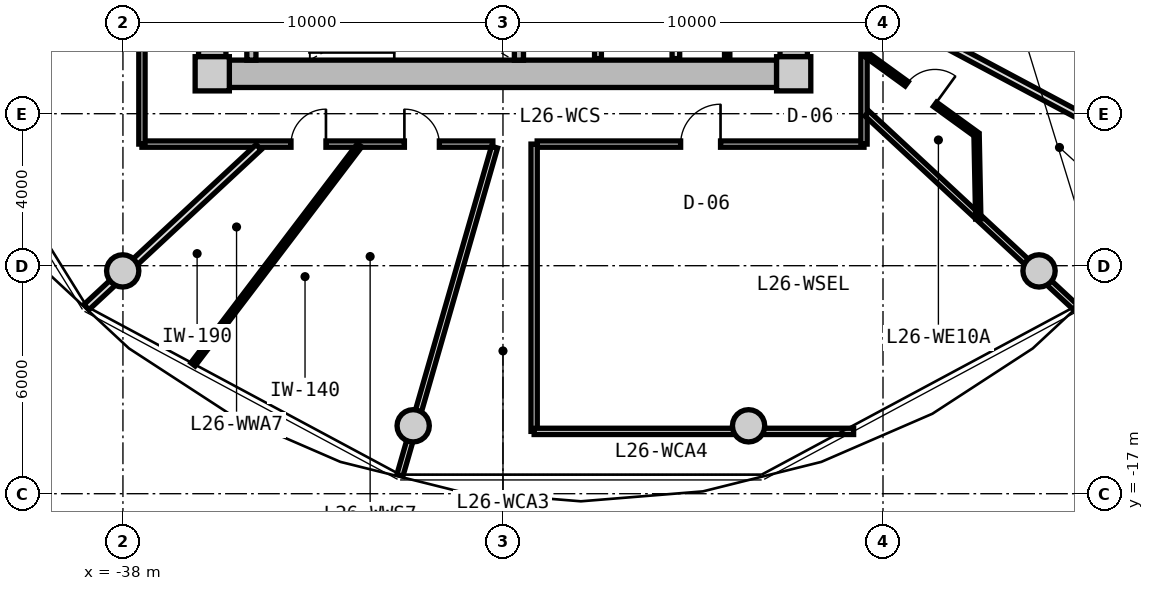
"""IFC4 building model, lengths in metres.
Left out: names, types, materials, properties, quantities, classifications, styles, units other than length and angle.
Written with IfcOpenShell. Run it as: python <this file> out.ifc"""

import sys

from ifc_helpers import new_model, si_unit, direction, frame, frame_2d, origin, origin_2d, place, context, subcontext, project, spatial, rectangle, circle, extrude, source, transform, mapped, element, fill, save


model = new_model("IFC4")
c1 = context("Model", 3, precision=1e-05, world=origin(), true_north=direction((0.0, 1.0)))
c2 = subcontext(c1, "Body", "Model", "MODEL_VIEW")
j1 = project(units=[si_unit("LENGTHUNIT", "METRE"), si_unit("PLANEANGLEUNIT", "RADIAN")], contexts=[c1])
p1 = place(None, origin())
s1 = spatial("IfcSite", under=j1, at=p1, CompositionType="ELEMENT")
p2 = place(p1, origin())
s2 = spatial("IfcBuilding", under=s1, at=p2, CompositionType="ELEMENT")
p3 = place(p2, frame((0.0, 0.0, 87.1)))
s3 = spatial("IfcBuildingStorey", under=s2, at=p3, CompositionType="ELEMENT", Elevation=87.1)
m1 = source(origin(), c2, "Body", "SweptSolid", [
    extrude(rectangle(XDim=0.9, YDim=0.9, at=origin_2d()), origin(), (0.0, 0.0, 1.0), 3.05),
])
for number, where, z_axis, x_axis in (
    (1, (-35.65, -5.95, 0.0), (0.0, 0.0, 1.0), (1.0, 0.0, 0.0)),
    (2, (-20.35, -5.95, 0.0), (0.0, 0.0, 1.0), (1.0, 0.0, 0.0)),
):
    element("IfcColumn", number, at=place(p3, frame(where, z_axis=z_axis, x_axis=x_axis)), inside=s3, PredefinedType="COLUMN", context=c2, shape_type="MappedRepresentation", body=[
        mapped(m1, transform((0.0, 0.0, 0.0), x_axis=(1.0, 0.0, 0.0), y_axis=(0.0, 1.0, 0.0), z_axis=(0.0, 0.0, 1.0), scale=1.0)),
    ])
m2 = source(origin(), c2, "Body", "SweptSolid", [
    extrude(rectangle(XDim=14.4, YDim=0.72, at=frame_2d((7.2, 0.0))), origin(), (0.0, 0.0, 1.0), 2.79),
])
p4 = place(p3, frame((-20.8, -5.95, 0.0), z_axis=(0.0, 0.0, 1.0), x_axis=(-1.0, 0.0, 0.0)))
e3 = element("IfcWall", 3, at=p4, inside=s3, PredefinedType="SHEAR", context=c2, shape_type="MappedRepresentation", body=[
    mapped(m2, transform((0.0, 0.0, 0.0), x_axis=(1.0, 0.0, 0.0), y_axis=(0.0, 1.0, 0.0), z_axis=(0.0, 0.0, 1.0), scale=1.0)),
])
m3 = source(origin(), c2, "Body", "SweptSolid", [
    extrude(rectangle(XDim=11.0, YDim=0.72, at=frame_2d((5.5, 0.0))), origin(), (0.0, 0.0, 1.0), 2.79),
])
p5 = place(p3, frame((-35.65, -5.5, 0.0), z_axis=(0.0, 0.0, 1.0), x_axis=(0.0, 1.0, 0.0)))
e4 = element("IfcWall", 4, at=p5, inside=s3, PredefinedType="SHEAR", context=c2, shape_type="MappedRepresentation", body=[
    mapped(m3, transform((0.0, 0.0, 0.0), x_axis=(1.0, 0.0, 0.0), y_axis=(0.0, 1.0, 0.0), z_axis=(0.0, 0.0, 1.0), scale=1.0)),
])
p6 = place(p5, frame((3.8, 0.0, 0.0)))
e5 = element("IfcOpeningElement", 5, at=p6, cuts=e4, PredefinedType="OPENING", context=c2, shape_type="SweptSolid", body=[
    extrude(rectangle(XDim=1.2, YDim=2.15, at=frame_2d((0.6, 1.075))), frame((0.0, 0.37, 0.0), z_axis=(0.0, -1.0, 0.0), x_axis=(1.0, 0.0, 0.0)), (0.0, 0.0, 1.0), 0.74),
])
p7 = place(p3, frame((-20.35, 5.5, 0.0), z_axis=(0.0, 0.0, 1.0), x_axis=(0.0, -1.0, 0.0)))
e6 = element("IfcWall", 6, at=p7, inside=s3, PredefinedType="SHEAR", context=c2, shape_type="MappedRepresentation", body=[
    mapped(m3, transform((0.0, 0.0, 0.0), x_axis=(1.0, 0.0, 0.0), y_axis=(0.0, 1.0, 0.0), z_axis=(0.0, 0.0, 1.0), scale=1.0)),
])
p8 = place(p7, frame((5.65, 0.0, 0.0)))
e7 = element("IfcOpeningElement", 7, at=p8, cuts=e6, PredefinedType="OPENING", context=c2, shape_type="SweptSolid", body=[
    extrude(rectangle(XDim=1.2, YDim=2.15, at=frame_2d((0.6, 1.075))), frame((0.0, 0.37, 0.0), z_axis=(0.0, -1.0, 0.0), x_axis=(1.0, 0.0, 0.0)), (0.0, 0.0, 1.0), 0.74),
])
m4 = source(origin(), c2, "Body", "SweptSolid", [
    extrude(circle(Radius=0.425, at=origin_2d()), origin(), (0.0, 0.0, 1.0), 3.05),
])
for number, where, z_axis, x_axis in (
    (8, (-38.006, -11.137, 0.0), (0.0, 0.0, 1.0), (1.0, 0.0, 0.0)),
    (9, (-30.363, -15.213, 0.0), (0.0, 0.0, 1.0), (1.0, 0.0, 0.0)),
    (10, (-21.537, -15.213, 0.0), (0.0, 0.0, 1.0), (1.0, 0.0, 0.0)),
    (11, (-13.894, -11.137, 0.0), (0.0, 0.0, 1.0), (1.0, 0.0, 0.0)),
):
    element("IfcColumn", number, at=place(p3, frame(where, z_axis=z_axis, x_axis=x_axis)), inside=s3, PredefinedType="COLUMN", context=c2, shape_type="MappedRepresentation", body=[
        mapped(m4, transform((0.0, 0.0, 0.0), x_axis=(1.0, 0.0, 0.0), y_axis=(0.0, 1.0, 0.0), z_axis=(0.0, 0.0, 1.0), scale=1.0)),
    ])
m5 = source(origin(), c2, "Body", "SweptSolid", [
    extrude(rectangle(XDim=3.14, YDim=0.24, at=frame_2d((1.57, 0.0))), origin(), (0.0, 0.0, 1.0), 2.79),
])
for number, where, z_axis, x_axis in (
    (12, (-34.62, -5.59, 0.0), (0.0, 0.0, 1.0), (0.0, 1.0, 0.0)),
    (13, (-27.58, -5.59, 0.0), (0.0, 0.0, 1.0), (0.0, 1.0, 0.0)),
):
    element("IfcWall", number, at=place(p3, frame(where, z_axis=z_axis, x_axis=x_axis)), inside=s3, PredefinedType="PARTITIONING", context=c2, shape_type="MappedRepresentation", body=[
        mapped(m5, transform((0.0, 0.0, 0.0), x_axis=(1.0, 0.0, 0.0), y_axis=(0.0, 1.0, 0.0), z_axis=(0.0, 0.0, 1.0), scale=1.0)),
    ])
m6 = source(origin(), c2, "Body", "SweptSolid", [
    extrude(rectangle(XDim=3.8, YDim=0.2, at=frame_2d((1.9, 0.0))), origin(), (0.0, 0.0, 1.0), 2.775),
])
p9 = place(p3, frame((-23.45, -5.55, 0.0), z_axis=(0.0, 0.0, 1.0), x_axis=(0.0, 1.0, 0.0)))
e14 = element("IfcWall", 14, at=p9, inside=s3, PredefinedType="PARTITIONING", context=c2, shape_type="MappedRepresentation", body=[
    mapped(m6, transform((0.0, 0.0, 0.0), x_axis=(1.0, 0.0, 0.0), y_axis=(0.0, 1.0, 0.0), z_axis=(0.0, 0.0, 1.0), scale=1.0)),
])
m7 = source(origin(), c2, "Body", "SweptSolid", [
    extrude(rectangle(XDim=3.22, YDim=0.18, at=frame_2d((1.61, 0.0))), origin(), (0.0, 0.0, 1.0), 2.775),
])
p10 = place(p3, frame((-25.5, -5.55, 0.0), z_axis=(0.0, 0.0, 1.0), x_axis=(0.0, 1.0, 0.0)))
e15 = element("IfcWall", 15, at=p10, inside=s3, PredefinedType="PARTITIONING", context=c2, shape_type="MappedRepresentation", body=[
    mapped(m7, transform((0.0, 0.0, 0.0), x_axis=(1.0, 0.0, 0.0), y_axis=(0.0, 1.0, 0.0), z_axis=(0.0, 0.0, 1.0), scale=1.0)),
])
m8 = source(origin(), c2, "Body", "SweptSolid", [
    extrude(rectangle(XDim=3.8, YDim=0.14, at=frame_2d((1.9, 0.0))), origin(), (0.0, 0.0, 1.0), 2.775),
])
p11 = place(p3, frame((-22.1, -5.55, 0.0), z_axis=(0.0, 0.0, 1.0), x_axis=(0.0, 1.0, 0.0)))
e16 = element("IfcWall", 16, at=p11, inside=s3, PredefinedType="PARTITIONING", context=c2, shape_type="MappedRepresentation", body=[
    mapped(m8, transform((0.0, 0.0, 0.0), x_axis=(1.0, 0.0, 0.0), y_axis=(0.0, 1.0, 0.0), z_axis=(0.0, 0.0, 1.0), scale=1.0)),
])
m9 = source(origin(), c2, "Body", "SweptSolid", [
    extrude(rectangle(XDim=8.6, YDim=0.165, at=frame_2d((4.3, 0.0))), origin(), (0.0, 0.0, 1.0), 2.775),
])
p12 = place(p3, frame((-18.5, -7.8, 0.0), z_axis=(0.0, 0.0, 1.0), x_axis=(-1.0, 0.0, 0.0)))
e17 = element("IfcWall", 17, at=p12, inside=s3, PredefinedType="PARTITIONING", context=c2, shape_type="MappedRepresentation", body=[
    mapped(m9, transform((0.0, 0.0, 0.0), x_axis=(1.0, 0.0, 0.0), y_axis=(0.0, 1.0, 0.0), z_axis=(0.0, 0.0, 1.0), scale=1.0)),
])
p13 = place(p12, frame((3.775, 0.0, 0.0)))
e18 = element("IfcOpeningElement", 18, at=p13, cuts=e17, PredefinedType="OPENING", context=c2, shape_type="SweptSolid", body=[
    extrude(rectangle(XDim=1.05, YDim=2.15, at=frame_2d((0.525, 1.075))), frame((0.0, 0.093, 0.0), z_axis=(0.0, -1.0, 0.0), x_axis=(1.0, 0.0, 0.0)), (0.0, 0.0, 1.0), 0.185),
])
m10 = source(origin(), c2, "Body", "SweptSolid", [
    extrude(rectangle(XDim=9.234, YDim=0.165, at=frame_2d((4.617, 0.0))), origin(), (0.0, 0.0, 1.0), 2.775),
])
p14 = place(p3, frame((-28.266, -7.8, 0.0), z_axis=(0.0, 0.0, 1.0), x_axis=(-1.0, 0.0, 0.0)))
e19 = element("IfcWall", 19, at=p14, inside=s3, PredefinedType="PARTITIONING", context=c2, shape_type="MappedRepresentation", body=[
    mapped(m10, transform((0.0, 0.0, 0.0), x_axis=(1.0, 0.0, 0.0), y_axis=(0.0, 1.0, 0.0), z_axis=(0.0, 0.0, 1.0), scale=1.0)),
])
p15 = place(p14, frame((4.392, 0.0, 0.0)))
e20 = element("IfcOpeningElement", 20, at=p15, cuts=e19, PredefinedType="OPENING", context=c2, shape_type="SweptSolid", body=[
    extrude(rectangle(XDim=0.92, YDim=2.1, at=frame_2d((0.46, 1.05))), frame((0.0, 0.093, 0.0), z_axis=(0.0, -1.0, 0.0), x_axis=(1.0, 0.0, 0.0)), (0.0, 0.0, 1.0), 0.185),
])
p16 = place(p14, frame((1.408, 0.0, 0.0)))
e21 = element("IfcOpeningElement", 21, at=p16, cuts=e19, PredefinedType="OPENING", context=c2, shape_type="SweptSolid", body=[
    extrude(rectangle(XDim=0.92, YDim=2.1, at=frame_2d((0.46, 1.05))), frame((0.0, 0.093, 0.0), z_axis=(0.0, -1.0, 0.0), x_axis=(1.0, 0.0, 0.0)), (0.0, 0.0, 1.0), 0.185),
])
m11 = source(origin(), c2, "Body", "SweptSolid", [
    extrude(rectangle(XDim=15.6, YDim=0.165, at=frame_2d((7.8, 0.0))), origin(), (0.0, 0.0, 1.0), 2.775),
])
p17 = place(p3, frame((-37.5, -7.8, 0.0), z_axis=(0.0, 0.0, 1.0), x_axis=(0.0, 1.0, 0.0)))
e22 = element("IfcWall", 22, at=p17, inside=s3, PredefinedType="PARTITIONING", context=c2, shape_type="MappedRepresentation", body=[
    mapped(m11, transform((0.0, 0.0, 0.0), x_axis=(1.0, 0.0, 0.0), y_axis=(0.0, 1.0, 0.0), z_axis=(0.0, 0.0, 1.0), scale=1.0)),
])
p18 = place(p17, frame((7.175, 0.0, 0.0)))
e23 = element("IfcOpeningElement", 23, at=p18, cuts=e22, PredefinedType="OPENING", context=c2, shape_type="SweptSolid", body=[
    extrude(rectangle(XDim=1.25, YDim=2.2, at=frame_2d((0.625, 1.1))), frame((0.0, 0.093, 0.0), z_axis=(0.0, -1.0, 0.0), x_axis=(1.0, 0.0, 0.0)), (0.0, 0.0, 1.0), 0.185),
])
p19 = place(p3, frame((-18.5, 7.8, 0.0), z_axis=(0.0, 0.0, 1.0), x_axis=(0.0, -1.0, 0.0)))
e24 = element("IfcWall", 24, at=p19, inside=s3, PredefinedType="PARTITIONING", context=c2, shape_type="MappedRepresentation", body=[
    mapped(m11, transform((0.0, 0.0, 0.0), x_axis=(1.0, 0.0, 0.0), y_axis=(0.0, 1.0, 0.0), z_axis=(0.0, 0.0, 1.0), scale=1.0)),
])
p20 = place(p19, frame((12.002, 0.0, 0.0)))
e25 = element("IfcOpeningElement", 25, at=p20, cuts=e24, PredefinedType="OPENING", context=c2, shape_type="SweptSolid", body=[
    extrude(rectangle(XDim=1.05, YDim=2.15, at=frame_2d((0.525, 1.075))), frame((0.0, 0.093, 0.0), z_axis=(0.0, -1.0, 0.0), x_axis=(1.0, 0.0, 0.0)), (0.0, 0.0, 1.0), 0.185),
])
p21 = place(p19, frame((10.211, 0.0, 0.0)))
e26 = element("IfcOpeningElement", 26, at=p21, cuts=e24, PredefinedType="OPENING", context=c2, shape_type="SweptSolid", body=[
    extrude(rectangle(XDim=1.05, YDim=2.15, at=frame_2d((0.525, 1.075))), frame((0.0, 0.093, 0.0), z_axis=(0.0, -1.0, 0.0), x_axis=(1.0, 0.0, 0.0)), (0.0, 0.0, 1.0), 0.185),
])
p22 = place(p19, frame((7.722, 0.0, 0.0)))
e27 = element("IfcOpeningElement", 27, at=p22, cuts=e24, PredefinedType="OPENING", context=c2, shape_type="SweptSolid", body=[
    extrude(rectangle(XDim=1.05, YDim=2.15, at=frame_2d((0.525, 1.075))), frame((0.0, 0.093, 0.0), z_axis=(0.0, -1.0, 0.0), x_axis=(1.0, 0.0, 0.0)), (0.0, 0.0, 1.0), 0.185),
])
p23 = place(p19, frame((6.291, 0.0, 0.0)))
e28 = element("IfcOpeningElement", 28, at=p23, cuts=e24, PredefinedType="OPENING", context=c2, shape_type="SweptSolid", body=[
    extrude(rectangle(XDim=1.05, YDim=2.15, at=frame_2d((0.525, 1.075))), frame((0.0, 0.093, 0.0), z_axis=(0.0, -1.0, 0.0), x_axis=(1.0, 0.0, 0.0)), (0.0, 0.0, 1.0), 0.185),
])
p24 = place(p19, frame((4.296, 0.0, 0.0)))
e29 = element("IfcOpeningElement", 29, at=p24, cuts=e24, PredefinedType="OPENING", context=c2, shape_type="SweptSolid", body=[
    extrude(rectangle(XDim=1.05, YDim=2.15, at=frame_2d((0.525, 1.075))), frame((0.0, 0.093, 0.0), z_axis=(0.0, -1.0, 0.0), x_axis=(1.0, 0.0, 0.0)), (0.0, 0.0, 1.0), 0.185),
])
p25 = place(p19, frame((1.654, 0.0, 0.0)))
e30 = element("IfcOpeningElement", 30, at=p25, cuts=e24, PredefinedType="OPENING", context=c2, shape_type="SweptSolid", body=[
    extrude(rectangle(XDim=1.05, YDim=2.15, at=frame_2d((0.525, 1.075))), frame((0.0, 0.093, 0.0), z_axis=(0.0, -1.0, 0.0), x_axis=(1.0, 0.0, 0.0)), (0.0, 0.0, 1.0), 0.185),
])
m12 = source(origin(), c2, "Body", "SweptSolid", [
    extrude(rectangle(XDim=8.989, YDim=0.165, at=frame_2d((4.495, 0.0))), origin(), (0.0, 0.0, 1.0), 2.275),
])
p26 = place(p3, frame((-28.222, -7.88, 0.0), z_axis=(0.0, 0.0, 1.0), x_axis=(-0.27702323008, -0.960863221274, 0.0)))
e31 = element("IfcWall", 31, at=p26, inside=s3, PredefinedType="PARTITIONING", context=c2, shape_type="MappedRepresentation", body=[
    mapped(m12, transform((0.0, 0.0, 0.0), x_axis=(1.0, 0.0, 0.0), y_axis=(0.0, 1.0, 0.0), z_axis=(0.0, 0.0, 1.0), scale=1.0)),
])
m13 = source(origin(), c2, "Body", "SweptSolid", [
    extrude(rectangle(XDim=7.482, YDim=0.165, at=frame_2d((3.741, 0.0))), origin(), (0.0, 0.0, 1.0), 2.275),
])
p27 = place(p3, frame((-18.42, -6.998, 0.0), z_axis=(0.0, 0.0, 1.0), x_axis=(0.732508698043, -0.680757671489, 0.0)))
e32 = element("IfcWall", 32, at=p27, inside=s3, PredefinedType="PARTITIONING", context=c2, shape_type="MappedRepresentation", body=[
    mapped(m13, transform((0.0, 0.0, 0.0), x_axis=(1.0, 0.0, 0.0), y_axis=(0.0, 1.0, 0.0), z_axis=(0.0, 0.0, 1.0), scale=1.0)),
])
m14 = source(origin(), c2, "Body", "SweptSolid", [
    extrude(rectangle(XDim=7.56, YDim=0.165, at=frame_2d((3.78, 0.0))), origin(), (0.0, 0.0, 1.0), 2.775),
])
p28 = place(p3, frame((-27.18, -15.36, 0.0), z_axis=(0.0, 0.0, 1.0), x_axis=(0.0, 1.0, 0.0)))
e33 = element("IfcWall", 33, at=p28, inside=s3, PredefinedType="PARTITIONING", context=c2, shape_type="MappedRepresentation", body=[
    mapped(m14, transform((0.0, 0.0, 0.0), x_axis=(1.0, 0.0, 0.0), y_axis=(0.0, 1.0, 0.0), z_axis=(0.0, 0.0, 1.0), scale=1.0)),
])
m15 = source(origin(), c2, "Body", "SweptSolid", [
    extrude(rectangle(XDim=8.407, YDim=0.165, at=frame_2d((4.204, 0.0))), origin(), (0.0, 0.0, 1.0), 2.275),
])
p29 = place(p3, frame((-27.18, -15.36, 0.0), z_axis=(0.0, 0.0, 1.0), x_axis=(1.0, 0.0, 0.0)))
e34 = element("IfcWall", 34, at=p29, inside=s3, PredefinedType="PARTITIONING", context=c2, shape_type="MappedRepresentation", body=[
    mapped(m15, transform((0.0, 0.0, 0.0), x_axis=(1.0, 0.0, 0.0), y_axis=(0.0, 1.0, 0.0), z_axis=(0.0, 0.0, 1.0), scale=1.0)),
])
m16 = source(origin(), c2, "Body", "SweptSolid", [
    extrude(rectangle(XDim=6.187, YDim=0.19, at=frame_2d((3.093, 0.0))), origin(), (0.0, 0.0, 1.0), 2.275),
])
p30 = place(p3, frame((-34.429, -7.88, 0.0), z_axis=(0.0, 0.0, 1.0), x_axis=(-0.732501077882, -0.680765870841, 0.0)))
e35 = element("IfcWall", 35, at=p30, inside=s3, PredefinedType="PARTITIONING", context=c2, shape_type="MappedRepresentation", body=[
    mapped(m16, transform((0.0, 0.0, 0.0), x_axis=(1.0, 0.0, 0.0), y_axis=(0.0, 1.0, 0.0), z_axis=(0.0, 0.0, 1.0), scale=1.0)),
])
m17 = source(origin(), c2, "Body", "SweptSolid", [
    extrude(rectangle(XDim=7.243, YDim=0.14, at=frame_2d((3.621, 0.0))), origin(), (0.0, 0.0, 1.0), 2.775),
])
p31 = place(p3, frame((-31.774, -7.83, 0.0), z_axis=(0.0, 0.0, 1.0), x_axis=(-0.605111472002, -0.796140757939, 0.0)))
e36 = element("IfcWall", 36, at=p31, inside=s3, PredefinedType="PARTITIONING", context=c2, shape_type="MappedRepresentation", body=[
    mapped(m17, transform((0.0, 0.0, 0.0), x_axis=(1.0, 0.0, 0.0), y_axis=(0.0, 1.0, 0.0), z_axis=(0.0, 0.0, 1.0), scale=1.0)),
])
m18 = source(origin(), c2, "Body", "SweptSolid", [
    extrude(rectangle(XDim=8.744, YDim=0.19, at=frame_2d((4.372, 0.0))), origin(), (0.0, 0.0, 1.0), 2.775),
])
p32 = place(p3, frame((-18.273, -4.142, 0.0), z_axis=(0.0, 0.0, 1.0), x_axis=(0.882252449936, -0.470776607938, 0.0)))
e37 = element("IfcWall", 37, at=p32, inside=s3, PredefinedType="PARTITIONING", context=c2, shape_type="MappedRepresentation", body=[
    mapped(m18, transform((0.0, 0.0, 0.0), x_axis=(1.0, 0.0, 0.0), y_axis=(0.0, 1.0, 0.0), z_axis=(0.0, 0.0, 1.0), scale=1.0)),
])
m19 = source(origin(), c2, "Body", "SweptSolid", [
    extrude(rectangle(XDim=3.621, YDim=0.14, at=frame_2d((1.811, 0.0))), origin(), (0.0, 0.0, 1.0), 2.775),
])
p33 = place(p3, frame((-18.47, -5.422, 0.0), z_axis=(0.0, 0.0, 1.0), x_axis=(0.80968252222, -0.586868139544, 0.0)))
e38 = element("IfcWall", 38, at=p33, inside=s3, PredefinedType="PARTITIONING", context=c2, shape_type="MappedRepresentation", body=[
    mapped(m19, transform((0.0, 0.0, 0.0), x_axis=(1.0, 0.0, 0.0), y_axis=(0.0, 1.0, 0.0), z_axis=(0.0, 0.0, 1.0), scale=1.0)),
])
p34 = place(p33, frame((1.351, 0.0, 0.0)))
e39 = element("IfcOpeningElement", 39, at=p34, cuts=e38, PredefinedType="OPENING", context=c2, shape_type="SweptSolid", body=[
    extrude(rectangle(XDim=0.92, YDim=2.1, at=frame_2d((0.46, 1.05))), frame((0.0, 0.08, 0.0), z_axis=(0.0, -1.0, 0.0), x_axis=(1.0, 0.0, 0.0)), (0.0, 0.0, 1.0), 0.16),
])
m20 = source(origin(), c2, "Body", "SweptSolid", [
    extrude(rectangle(XDim=2.225, YDim=0.14, at=frame_2d((1.112, 0.0))), origin(), (0.0, 0.0, 1.0), 2.775),
])
p35 = place(p3, frame((-15.538, -7.547, 0.0), z_axis=(0.0, 0.0, 1.0), x_axis=(0.019971869027, -0.999800542332, 0.0)))
e40 = element("IfcWall", 40, at=p35, inside=s3, PredefinedType="PARTITIONING", context=c2, shape_type="MappedRepresentation", body=[
    mapped(m20, transform((0.0, 0.0, 0.0), x_axis=(1.0, 0.0, 0.0), y_axis=(0.0, 1.0, 0.0), z_axis=(0.0, 0.0, 1.0), scale=1.0)),
])
m21 = source(origin(), c2, "Body", "SweptSolid", [
    extrude(rectangle(XDim=1.05, YDim=2.15, at=frame_2d((0.525, 1.075))), frame((0.0, 0.025, 0.0), z_axis=(0.0, -1.0, 0.0), x_axis=(1.0, 0.0, 0.0)), (0.0, 0.0, 1.0), 0.05),
])
p36 = place(p13, frame((1.05, 0.0, 0.0), z_axis=(0.0, 0.0, 1.0), x_axis=(-1.0, 0.0, 0.0)))
e41 = element("IfcDoor", 41, at=p36, inside=s3, OperationType="SINGLE_SWING_RIGHT", PredefinedType="DOOR", context=c2, shape_type="MappedRepresentation", body=[
    mapped(m21, transform((0.0, 0.0, 0.0), x_axis=(1.0, 0.0, 0.0), y_axis=(0.0, 1.0, 0.0), z_axis=(0.0, 0.0, 1.0), scale=1.0)),
])
fill(e18, e41)
m22 = source(origin(), c2, "Body", "SweptSolid", [
    extrude(rectangle(XDim=0.92, YDim=2.1, at=frame_2d((0.46, 1.05))), frame((0.0, 0.025, 0.0), z_axis=(0.0, -1.0, 0.0), x_axis=(1.0, 0.0, 0.0)), (0.0, 0.0, 1.0), 0.05),
])
p37 = place(p15, frame((0.92, 0.0, 0.0), z_axis=(0.0, 0.0, 1.0), x_axis=(-1.0, 0.0, 0.0)))
e42 = element("IfcDoor", 42, at=p37, inside=s3, OperationType="SINGLE_SWING_RIGHT", PredefinedType="DOOR", context=c2, shape_type="MappedRepresentation", body=[
    mapped(m22, transform((0.0, 0.0, 0.0), x_axis=(1.0, 0.0, 0.0), y_axis=(0.0, 1.0, 0.0), z_axis=(0.0, 0.0, 1.0), scale=1.0)),
])
fill(e20, e42)
p38 = place(p16, frame((0.92, 0.0, 0.0), z_axis=(0.0, 0.0, 1.0), x_axis=(-1.0, 0.0, 0.0)))
e43 = element("IfcDoor", 43, at=p38, inside=s3, OperationType="SINGLE_SWING_LEFT", PredefinedType="DOOR", context=c2, shape_type="MappedRepresentation", body=[
    mapped(m22, transform((0.0, 0.0, 0.0), x_axis=(1.0, 0.0, 0.0), y_axis=(0.0, 1.0, 0.0), z_axis=(0.0, 0.0, 1.0), scale=1.0)),
])
fill(e21, e43)
p39 = place(p34, origin())
e44 = element("IfcDoor", 44, at=p39, inside=s3, OperationType="SINGLE_SWING_RIGHT", PredefinedType="DOOR", context=c2, shape_type="MappedRepresentation", body=[
    mapped(m22, transform((0.0, 0.0, 0.0), x_axis=(1.0, 0.0, 0.0), y_axis=(0.0, 1.0, 0.0), z_axis=(0.0, 0.0, 1.0), scale=1.0)),
])
fill(e39, e44)
save(model, sys.argv[1])
